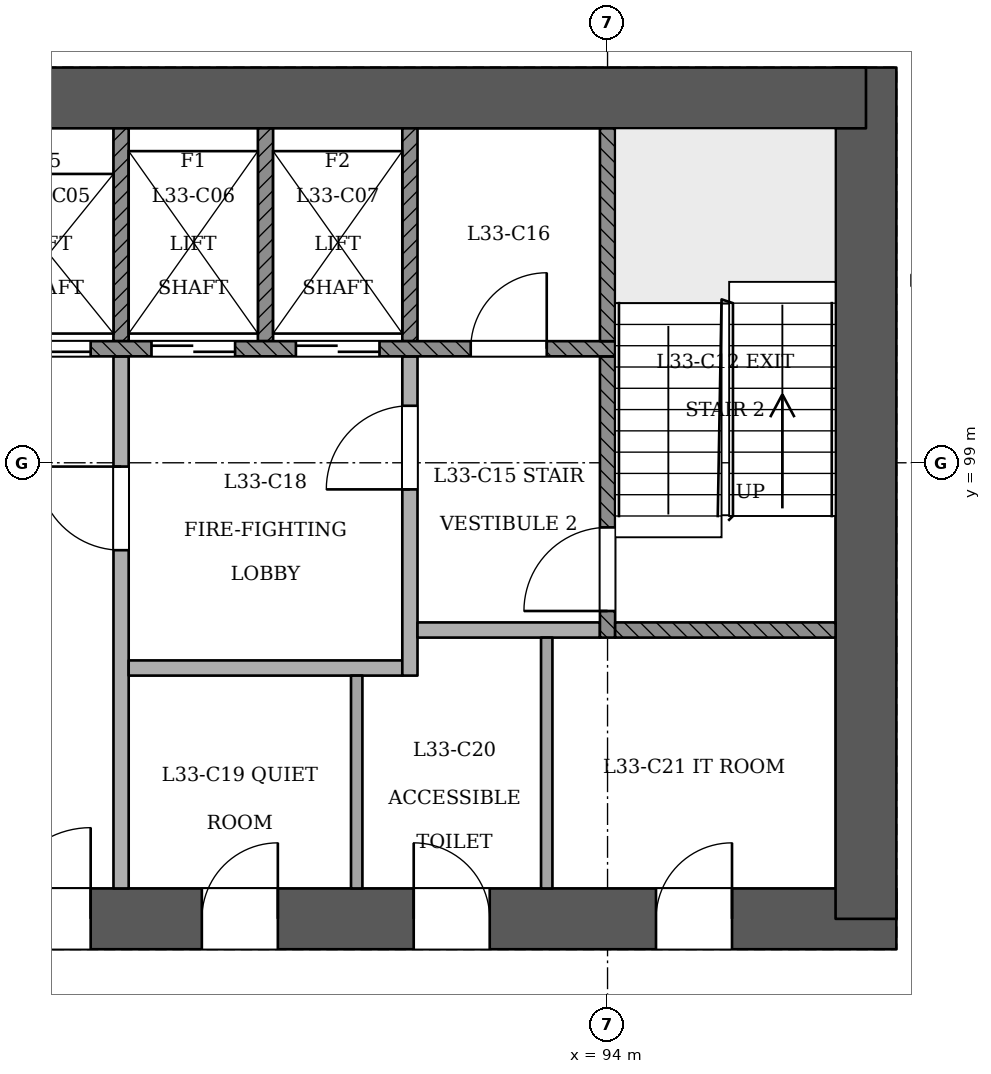
"""IFC4 building model, lengths in metres.
Left out: names, types, materials, properties, quantities, classifications, styles, units other than length and angle.
Written with IfcOpenShell. Run it as: python <this file> out.ifc"""

import sys

from ifc_helpers import new_model, si_unit, direction, frame, frame_2d, origin, place, context, subcontext, project, spatial, rectangle, extrude, element, fill, save


model = new_model("IFC4")
c1 = context("Model", 3, precision=1e-05, world=origin(), true_north=direction((0.0, 1.0)))
c2 = subcontext(c1, "Body", "Model", "MODEL_VIEW")
j1 = project(units=[si_unit("LENGTHUNIT", "METRE"), si_unit("PLANEANGLEUNIT", "RADIAN")], contexts=[c1])
p1 = place(None, origin())
s1 = spatial("IfcSite", under=j1, at=p1, CompositionType="ELEMENT")
p2 = place(p1, origin())
s2 = spatial("IfcBuilding", under=s1, at=p2, CompositionType="ELEMENT")
p3 = place(p2, frame((0.0, 0.0, 131.4)))
s3 = spatial("IfcBuildingStorey", under=s2, at=p3, CompositionType="ELEMENT", Elevation=131.4)
p4 = place(p3, frame((72.6, 93.0, 0.0), z_axis=(0.0, 0.0, 1.0), x_axis=(1.0, 0.0, 0.0)))
e1 = element("IfcWall", 1, at=p4, inside=s3, PredefinedType="SHEAR", context=c2, shape_type="SweptSolid", body=[
    extrude(rectangle(XDim=25.2, YDim=0.8, at=frame_2d((12.6, 0.0))), origin(), (0.0, 0.0, 1.0), 3.6),
])
p5 = place(p4, frame((1.2, 0.0, 0.0)))
e2 = element("IfcOpeningElement", 2, at=p5, cuts=e1, PredefinedType="OPENING", context=c2, shape_type="SweptSolid", body=[
    extrude(rectangle(XDim=1.2, YDim=2.1, at=frame_2d((0.6, 1.05))), frame((0.0, 0.411, 0.0), z_axis=(0.0, -1.0, 0.0), x_axis=(1.0, 0.0, 0.0)), (0.0, 0.0, 1.0), 0.821),
])
p6 = place(p4, frame((3.4, 0.0, 0.0)))
e3 = element("IfcOpeningElement", 3, at=p6, cuts=e1, PredefinedType="OPENING", context=c2, shape_type="SweptSolid", body=[
    extrude(rectangle(XDim=1.2, YDim=2.1, at=frame_2d((0.6, 1.05))), frame((0.0, 0.411, 0.0), z_axis=(0.0, -1.0, 0.0), x_axis=(1.0, 0.0, 0.0)), (0.0, 0.0, 1.0), 0.821),
])
p7 = place(p4, frame((13.4, 0.0, 0.0)))
e4 = element("IfcOpeningElement", 4, at=p7, cuts=e1, PredefinedType="OPENING", context=c2, shape_type="SweptSolid", body=[
    extrude(rectangle(XDim=1.2, YDim=2.1, at=frame_2d((0.6, 1.05))), frame((0.0, 0.411, 0.0), z_axis=(0.0, -1.0, 0.0), x_axis=(1.0, 0.0, 0.0)), (0.0, 0.0, 1.0), 0.821),
])
p8 = place(p4, frame((16.062, 0.0, 0.0)))
e5 = element("IfcOpeningElement", 5, at=p8, cuts=e1, PredefinedType="OPENING", context=c2, shape_type="SweptSolid", body=[
    extrude(rectangle(XDim=1.0, YDim=2.1, at=frame_2d((0.5, 1.05))), frame((0.0, 0.411, 0.0), z_axis=(0.0, -1.0, 0.0), x_axis=(1.0, 0.0, 0.0)), (0.0, 0.0, 1.0), 0.821),
])
p9 = place(p4, frame((18.85, 0.0, 0.0)))
e6 = element("IfcOpeningElement", 6, at=p9, cuts=e1, PredefinedType="OPENING", context=c2, shape_type="SweptSolid", body=[
    extrude(rectangle(XDim=1.0, YDim=2.1, at=frame_2d((0.5, 1.05))), frame((0.0, 0.411, 0.0), z_axis=(0.0, -1.0, 0.0), x_axis=(1.0, 0.0, 0.0)), (0.0, 0.0, 1.0), 0.821),
])
p10 = place(p4, frame((22.038, 0.0, 0.0)))
e7 = element("IfcOpeningElement", 7, at=p10, cuts=e1, PredefinedType="OPENING", context=c2, shape_type="SweptSolid", body=[
    extrude(rectangle(XDim=1.0, YDim=2.1, at=frame_2d((0.5, 1.05))), frame((0.0, 0.411, 0.0), z_axis=(0.0, -1.0, 0.0), x_axis=(1.0, 0.0, 0.0)), (0.0, 0.0, 1.0), 0.821),
])
p11 = place(p3, frame((97.4, 93.0, 0.0), z_axis=(0.0, 0.0, 1.0), x_axis=(0.0, 1.0, 0.0)))
e8 = element("IfcWall", 8, at=p11, inside=s3, PredefinedType="SHEAR", context=c2, shape_type="SweptSolid", body=[
    extrude(rectangle(XDim=11.2, YDim=0.8, at=frame_2d((5.6, 0.0))), origin(), (0.0, 0.0, 1.0), 3.6),
])
p12 = place(p3, frame((97.4, 103.8, 0.0), z_axis=(0.0, 0.0, 1.0), x_axis=(-1.0, 0.0, 0.0)))
e9 = element("IfcWall", 9, at=p12, inside=s3, PredefinedType="SHEAR", context=c2, shape_type="SweptSolid", body=[
    extrude(rectangle(XDim=25.2, YDim=0.8, at=frame_2d((12.6, 0.0))), origin(), (0.0, 0.0, 1.0), 3.6),
])
p13 = place(p3, frame((85.131, 63.263, 0.0), z_axis=(0.0, 0.0, 1.0), x_axis=(0.500002881847, 0.866023739943, 0.0)))
e10 = element("IfcWall", 10, at=p13, inside=s3, PredefinedType="PARTITIONING", context=c2, shape_type="SweptSolid", body=[
    extrude(rectangle(XDim=34.013, YDim=0.15, at=frame_2d((17.006, 0.0))), origin(), (0.0, 0.0, 1.0), 2.75),
])
p14 = place(p13, frame((0.351, 0.0, 0.0)))
e11 = element("IfcOpeningElement", 11, at=p14, cuts=e10, PredefinedType="OPENING", context=c2, shape_type="SweptSolid", body=[
    extrude(rectangle(XDim=1.2, YDim=2.1, at=frame_2d((0.6, 1.05))), frame((0.0, 0.085, 0.0), z_axis=(0.0, -1.0, 0.0), x_axis=(1.0, 0.0, 0.0)), (0.0, 0.0, 1.0), 0.171),
])
p15 = place(p13, frame((3.963, 0.0, 0.0)))
e12 = element("IfcOpeningElement", 12, at=p15, cuts=e10, PredefinedType="OPENING", context=c2, shape_type="SweptSolid", body=[
    extrude(rectangle(XDim=1.0, YDim=2.1, at=frame_2d((0.5, 1.05))), frame((0.0, 0.085, 0.0), z_axis=(0.0, -1.0, 0.0), x_axis=(1.0, 0.0, 0.0)), (0.0, 0.0, 1.0), 0.171),
])
p16 = place(p13, frame((9.493, 0.0, 0.0)))
e13 = element("IfcOpeningElement", 13, at=p16, cuts=e10, PredefinedType="OPENING", context=c2, shape_type="SweptSolid", body=[
    extrude(rectangle(XDim=1.0, YDim=2.1, at=frame_2d((0.5, 1.05))), frame((0.0, 0.085, 0.0), z_axis=(0.0, -1.0, 0.0), x_axis=(1.0, 0.0, 0.0)), (0.0, 0.0, 1.0), 0.171),
])
p17 = place(p13, frame((11.818, 0.0, 0.0)))
e14 = element("IfcOpeningElement", 14, at=p17, cuts=e10, PredefinedType="OPENING", context=c2, shape_type="SweptSolid", body=[
    extrude(rectangle(XDim=1.0, YDim=2.1, at=frame_2d((0.5, 1.05))), frame((0.0, 0.085, 0.0), z_axis=(0.0, -1.0, 0.0), x_axis=(1.0, 0.0, 0.0)), (0.0, 0.0, 1.0), 0.171),
])
p18 = place(p13, frame((18.608, 0.0, 0.0)))
e15 = element("IfcOpeningElement", 15, at=p18, cuts=e10, PredefinedType="OPENING", context=c2, shape_type="SweptSolid", body=[
    extrude(rectangle(XDim=1.0, YDim=2.1, at=frame_2d((0.5, 1.05))), frame((0.0, 0.085, 0.0), z_axis=(0.0, -1.0, 0.0), x_axis=(1.0, 0.0, 0.0)), (0.0, 0.0, 1.0), 0.171),
])
p19 = place(p13, frame((20.933, 0.0, 0.0)))
e16 = element("IfcOpeningElement", 16, at=p19, cuts=e10, PredefinedType="OPENING", context=c2, shape_type="SweptSolid", body=[
    extrude(rectangle(XDim=1.0, YDim=2.1, at=frame_2d((0.5, 1.05))), frame((0.0, 0.085, 0.0), z_axis=(0.0, -1.0, 0.0), x_axis=(1.0, 0.0, 0.0)), (0.0, 0.0, 1.0), 0.171),
])
p20 = place(p13, frame((27.493, 0.0, 0.0)))
e17 = element("IfcOpeningElement", 17, at=p20, cuts=e10, PredefinedType="OPENING", context=c2, shape_type="SweptSolid", body=[
    extrude(rectangle(XDim=1.0, YDim=2.1, at=frame_2d((0.5, 1.05))), frame((0.0, 0.085, 0.0), z_axis=(0.0, -1.0, 0.0), x_axis=(1.0, 0.0, 0.0)), (0.0, 0.0, 1.0), 0.171),
])
p21 = place(p13, frame((29.933, 0.0, 0.0)))
e18 = element("IfcOpeningElement", 18, at=p21, cuts=e10, PredefinedType="OPENING", context=c2, shape_type="SweptSolid", body=[
    extrude(rectangle(XDim=1.0, YDim=2.1, at=frame_2d((0.5, 1.05))), frame((0.0, 0.085, 0.0), z_axis=(0.0, -1.0, 0.0), x_axis=(1.0, 0.0, 0.0)), (0.0, 0.0, 1.0), 0.171),
])
p22 = place(p3, frame((87.6, 93.4, 0.0), z_axis=(0.0, 0.0, 1.0), x_axis=(0.0, 1.0, 0.0)))
e19 = element("IfcWall", 19, at=p22, inside=s3, PredefinedType="PARTITIONING", context=c2, shape_type="SweptSolid", body=[
    extrude(rectangle(XDim=7.0, YDim=0.2, at=frame_2d((3.5, 0.0))), origin(), (0.0, 0.0, 1.0), 3.15),
])
p23 = place(p22, frame((4.45, 0.0, 0.0)))
e20 = element("IfcOpeningElement", 20, at=p23, cuts=e19, PredefinedType="OPENING", context=c2, shape_type="SweptSolid", body=[
    extrude(rectangle(XDim=1.1, YDim=2.1, at=frame_2d((0.55, 1.05))), frame((0.0, 0.11, 0.0), z_axis=(0.0, -1.0, 0.0), x_axis=(1.0, 0.0, 0.0)), (0.0, 0.0, 1.0), 0.221),
])
p24 = place(p3, frame((90.7, 93.4, 0.0), z_axis=(0.0, 0.0, 1.0), x_axis=(0.0, 1.0, 0.0)))
e21 = element("IfcWall", 21, at=p24, inside=s3, PredefinedType="PARTITIONING", context=c2, shape_type="SweptSolid", body=[
    extrude(rectangle(XDim=2.8, YDim=0.15, at=frame_2d((1.4, 0.0))), origin(), (0.0, 0.0, 1.0), 3.15),
])
p25 = place(p3, frame((93.2, 93.4, 0.0), z_axis=(0.0, 0.0, 1.0), x_axis=(0.0, 1.0, 0.0)))
e22 = element("IfcWall", 22, at=p25, inside=s3, PredefinedType="PARTITIONING", context=c2, shape_type="SweptSolid", body=[
    extrude(rectangle(XDim=3.3, YDim=0.15, at=frame_2d((1.65, 0.0))), origin(), (0.0, 0.0, 1.0), 3.15),
])
p26 = place(p3, frame((87.7, 96.3, 0.0), z_axis=(0.0, 0.0, 1.0), x_axis=(1.0, 0.0, 0.0)))
e23 = element("IfcWall", 23, at=p26, inside=s3, PredefinedType="PARTITIONING", context=c2, shape_type="SweptSolid", body=[
    extrude(rectangle(XDim=3.6, YDim=0.2, at=frame_2d((1.8, 0.0))), origin(), (0.0, 0.0, 1.0), 3.15),
])
p27 = place(p3, frame((91.4, 96.2, 0.0), z_axis=(0.0, 0.0, 1.0), x_axis=(0.0, 1.0, 0.0)))
e24 = element("IfcWall", 24, at=p27, inside=s3, PredefinedType="PARTITIONING", context=c2, shape_type="SweptSolid", body=[
    extrude(rectangle(XDim=4.2, YDim=0.2, at=frame_2d((2.1, 0.0))), origin(), (0.0, 0.0, 1.0), 3.15),
])
p28 = place(p27, frame((2.45, 0.0, 0.0)))
e25 = element("IfcOpeningElement", 25, at=p28, cuts=e24, PredefinedType="OPENING", context=c2, shape_type="SweptSolid", body=[
    extrude(rectangle(XDim=1.1, YDim=2.1, at=frame_2d((0.55, 1.05))), frame((0.0, 0.11, 0.0), z_axis=(0.0, -1.0, 0.0), x_axis=(1.0, 0.0, 0.0)), (0.0, 0.0, 1.0), 0.221),
])
p29 = place(p3, frame((91.5, 96.8, 0.0), z_axis=(0.0, 0.0, 1.0), x_axis=(1.0, 0.0, 0.0)))
e26 = element("IfcWall", 26, at=p29, inside=s3, PredefinedType="PARTITIONING", context=c2, shape_type="SweptSolid", body=[
    extrude(rectangle(XDim=2.4, YDim=0.2, at=frame_2d((1.2, 0.0))), origin(), (0.0, 0.0, 1.0), 3.15),
])
p30 = place(p3, frame((94.0, 96.7, 0.0), z_axis=(0.0, 0.0, 1.0), x_axis=(0.0, 1.0, 0.0)))
e27 = element("IfcWall", 27, at=p30, inside=s3, PredefinedType="SOLIDWALL", context=c2, shape_type="SweptSolid", body=[
    extrude(rectangle(XDim=3.7, YDim=0.2, at=frame_2d((1.85, 0.0))), origin(), (0.0, 0.0, 1.0), 3.15),
])
p31 = place(p30, frame((0.35, 0.0, 0.0)))
e28 = element("IfcOpeningElement", 28, at=p31, cuts=e27, PredefinedType="OPENING", context=c2, shape_type="SweptSolid", body=[
    extrude(rectangle(XDim=1.1, YDim=2.1, at=frame_2d((0.55, 1.05))), frame((0.0, 0.11, 0.0), z_axis=(0.0, -1.0, 0.0), x_axis=(1.0, 0.0, 0.0)), (0.0, 0.0, 1.0), 0.221),
])
p32 = place(p3, frame((94.1, 96.8, 0.0), z_axis=(0.0, 0.0, 1.0), x_axis=(1.0, 0.0, 0.0)))
e29 = element("IfcWall", 29, at=p32, inside=s3, PredefinedType="SOLIDWALL", context=c2, shape_type="SweptSolid", body=[
    extrude(rectangle(XDim=2.9, YDim=0.2, at=frame_2d((1.45, 0.0))), origin(), (0.0, 0.0, 1.0), 3.15),
])
p33 = place(p3, frame((75.9, 100.5, 0.0), z_axis=(0.0, 0.0, 1.0), x_axis=(1.0, 0.0, 0.0)))
e30 = element("IfcWall", 30, at=p33, inside=s3, PredefinedType="SOLIDWALL", context=c2, shape_type="SweptSolid", body=[
    extrude(rectangle(XDim=18.2, YDim=0.2, at=frame_2d((9.1, 0.0))), origin(), (0.0, 0.0, 1.0), 3.15),
])
p34 = place(p33, frame((2.6, 0.0, 0.0)))
e31 = element("IfcOpeningElement", 31, at=p34, cuts=e30, PredefinedType="OPENING", context=c2, shape_type="SweptSolid", body=[
    extrude(rectangle(XDim=1.1, YDim=2.1, at=frame_2d((0.55, 1.05))), frame((0.0, 0.11, 0.0), z_axis=(0.0, -1.0, 0.0), x_axis=(1.0, 0.0, 0.0)), (0.0, 0.0, 1.0), 0.221),
])
p35 = place(p33, frame((4.5, 0.0, 0.0)))
e32 = element("IfcOpeningElement", 32, at=p35, cuts=e30, PredefinedType="OPENING", context=c2, shape_type="SweptSolid", body=[
    extrude(rectangle(XDim=1.1, YDim=2.1, at=frame_2d((0.55, 1.05))), frame((0.0, 0.11, 0.0), z_axis=(0.0, -1.0, 0.0), x_axis=(1.0, 0.0, 0.0)), (0.0, 0.0, 1.0), 0.221),
])
p36 = place(p33, frame((6.4, 0.0, 0.0)))
e33 = element("IfcOpeningElement", 33, at=p36, cuts=e30, PredefinedType="OPENING", context=c2, shape_type="SweptSolid", body=[
    extrude(rectangle(XDim=1.1, YDim=2.1, at=frame_2d((0.55, 1.05))), frame((0.0, 0.11, 0.0), z_axis=(0.0, -1.0, 0.0), x_axis=(1.0, 0.0, 0.0)), (0.0, 0.0, 1.0), 0.221),
])
p37 = place(p33, frame((8.3, 0.0, 0.0)))
e34 = element("IfcOpeningElement", 34, at=p37, cuts=e30, PredefinedType="OPENING", context=c2, shape_type="SweptSolid", body=[
    extrude(rectangle(XDim=1.1, YDim=2.1, at=frame_2d((0.55, 1.05))), frame((0.0, 0.11, 0.0), z_axis=(0.0, -1.0, 0.0), x_axis=(1.0, 0.0, 0.0)), (0.0, 0.0, 1.0), 0.221),
])
p38 = place(p33, frame((10.2, 0.0, 0.0)))
e35 = element("IfcOpeningElement", 35, at=p38, cuts=e30, PredefinedType="OPENING", context=c2, shape_type="SweptSolid", body=[
    extrude(rectangle(XDim=1.1, YDim=2.1, at=frame_2d((0.55, 1.05))), frame((0.0, 0.11, 0.0), z_axis=(0.0, -1.0, 0.0), x_axis=(1.0, 0.0, 0.0)), (0.0, 0.0, 1.0), 0.221),
])
p39 = place(p33, frame((12.1, 0.0, 0.0)))
e36 = element("IfcOpeningElement", 36, at=p39, cuts=e30, PredefinedType="OPENING", context=c2, shape_type="SweptSolid", body=[
    extrude(rectangle(XDim=1.1, YDim=2.1, at=frame_2d((0.55, 1.05))), frame((0.0, 0.11, 0.0), z_axis=(0.0, -1.0, 0.0), x_axis=(1.0, 0.0, 0.0)), (0.0, 0.0, 1.0), 0.221),
])
p40 = place(p33, frame((14.0, 0.0, 0.0)))
e37 = element("IfcOpeningElement", 37, at=p40, cuts=e30, PredefinedType="OPENING", context=c2, shape_type="SweptSolid", body=[
    extrude(rectangle(XDim=1.1, YDim=2.1, at=frame_2d((0.55, 1.05))), frame((0.0, 0.11, 0.0), z_axis=(0.0, -1.0, 0.0), x_axis=(1.0, 0.0, 0.0)), (0.0, 0.0, 1.0), 0.221),
])
p41 = place(p33, frame((0.65, 0.0, 0.0)))
e38 = element("IfcOpeningElement", 38, at=p41, cuts=e30, PredefinedType="OPENING", context=c2, shape_type="SweptSolid", body=[
    extrude(rectangle(XDim=1.0, YDim=2.1, at=frame_2d((0.5, 1.05))), frame((0.0, 0.11, 0.0), z_axis=(0.0, -1.0, 0.0), x_axis=(1.0, 0.0, 0.0)), (0.0, 0.0, 1.0), 0.221),
])
p42 = place(p33, frame((16.3, 0.0, 0.0)))
e39 = element("IfcOpeningElement", 39, at=p42, cuts=e30, PredefinedType="OPENING", context=c2, shape_type="SweptSolid", body=[
    extrude(rectangle(XDim=1.0, YDim=2.1, at=frame_2d((0.5, 1.05))), frame((0.0, 0.11, 0.0), z_axis=(0.0, -1.0, 0.0), x_axis=(1.0, 0.0, 0.0)), (0.0, 0.0, 1.0), 0.221),
])
for number, where, z_axis, x_axis in (
    (40, (87.6, 100.6, 0.0), (0.0, 0.0, 1.0), (0.0, 1.0, 0.0)),
    (41, (89.5, 100.6, 0.0), (0.0, 0.0, 1.0), (0.0, 1.0, 0.0)),
    (42, (91.4, 100.6, 0.0), (0.0, 0.0, 1.0), (0.0, 1.0, 0.0)),
    (43, (94.0, 100.6, 0.0), (0.0, 0.0, 1.0), (0.0, 1.0, 0.0)),
):
    element("IfcWall", number, at=place(p3, frame(where, z_axis=z_axis, x_axis=x_axis)), inside=s3, PredefinedType="SOLIDWALL", context=c2, shape_type="SweptSolid", body=[
        extrude(rectangle(XDim=2.8, YDim=0.2, at=frame_2d((1.4, 0.0))), origin(), (0.0, 0.0, 1.0), 3.15),
    ])
p43 = place(p38, origin())
e44 = element("IfcDoor", 44, at=p43, inside=s3, OperationType="SLIDING_TO_RIGHT", PredefinedType="NOTDEFINED", context=c2, shape_type="SweptSolid", body=[
    extrude(rectangle(XDim=1.1, YDim=2.1, at=frame_2d((0.55, 1.05))), frame((0.0, 0.025, 0.0), z_axis=(0.0, -1.0, 0.0), x_axis=(1.0, 0.0, 0.0)), (0.0, 0.0, 1.0), 0.05),
])
fill(e35, e44)
p44 = place(p39, origin())
e45 = element("IfcDoor", 45, at=p44, inside=s3, OperationType="SLIDING_TO_RIGHT", PredefinedType="NOTDEFINED", context=c2, shape_type="SweptSolid", body=[
    extrude(rectangle(XDim=1.1, YDim=2.1, at=frame_2d((0.55, 1.05))), frame((0.0, 0.025, 0.0), z_axis=(0.0, -1.0, 0.0), x_axis=(1.0, 0.0, 0.0)), (0.0, 0.0, 1.0), 0.05),
])
fill(e36, e45)
p45 = place(p40, origin())
e46 = element("IfcDoor", 46, at=p45, inside=s3, OperationType="SLIDING_TO_LEFT", PredefinedType="NOTDEFINED", context=c2, shape_type="SweptSolid", body=[
    extrude(rectangle(XDim=1.1, YDim=2.1, at=frame_2d((0.55, 1.05))), frame((0.0, 0.025, 0.0), z_axis=(0.0, -1.0, 0.0), x_axis=(1.0, 0.0, 0.0)), (0.0, 0.0, 1.0), 0.05),
])
fill(e37, e46)
p46 = place(p31, origin())
e47 = element("IfcDoor", 47, at=p46, inside=s3, OperationType="SINGLE_SWING_LEFT", PredefinedType="NOTDEFINED", context=c2, shape_type="SweptSolid", body=[
    extrude(rectangle(XDim=1.1, YDim=2.1, at=frame_2d((0.55, 1.05))), frame((0.0, 0.025, 0.0), z_axis=(0.0, -1.0, 0.0), x_axis=(1.0, 0.0, 0.0)), (0.0, 0.0, 1.0), 0.05),
])
fill(e28, e47)
p47 = place(p23, origin())
e48 = element("IfcDoor", 48, at=p47, inside=s3, OperationType="SINGLE_SWING_RIGHT", PredefinedType="NOTDEFINED", context=c2, shape_type="SweptSolid", body=[
    extrude(rectangle(XDim=1.1, YDim=2.1, at=frame_2d((0.55, 1.05))), frame((0.0, 0.025, 0.0), z_axis=(0.0, -1.0, 0.0), x_axis=(1.0, 0.0, 0.0)), (0.0, 0.0, 1.0), 0.05),
])
fill(e20, e48)
p48 = place(p28, origin())
e49 = element("IfcDoor", 49, at=p48, inside=s3, OperationType="SINGLE_SWING_LEFT", PredefinedType="NOTDEFINED", context=c2, shape_type="SweptSolid", body=[
    extrude(rectangle(XDim=1.1, YDim=2.1, at=frame_2d((0.55, 1.05))), frame((0.0, 0.025, 0.0), z_axis=(0.0, -1.0, 0.0), x_axis=(1.0, 0.0, 0.0)), (0.0, 0.0, 1.0), 0.05),
])
fill(e25, e49)
p49 = place(p7, origin())
e50 = element("IfcDoor", 50, at=p49, inside=s3, OperationType="SINGLE_SWING_RIGHT", PredefinedType="NOTDEFINED", context=c2, shape_type="SweptSolid", body=[
    extrude(rectangle(XDim=1.2, YDim=2.1, at=frame_2d((0.6, 1.05))), frame((0.0, 0.025, 0.0), z_axis=(0.0, -1.0, 0.0), x_axis=(1.0, 0.0, 0.0)), (0.0, 0.0, 1.0), 0.05),
])
fill(e4, e50)
p50 = place(p42, origin())
e51 = element("IfcDoor", 51, at=p50, inside=s3, OperationType="SINGLE_SWING_RIGHT", PredefinedType="NOTDEFINED", context=c2, shape_type="SweptSolid", body=[
    extrude(rectangle(XDim=1.0, YDim=2.1, at=frame_2d((0.5, 1.05))), frame((0.0, 0.025, 0.0), z_axis=(0.0, -1.0, 0.0), x_axis=(1.0, 0.0, 0.0)), (0.0, 0.0, 1.0), 0.05),
])
fill(e39, e51)
p51 = place(p8, origin())
e52 = element("IfcDoor", 52, at=p51, inside=s3, OperationType="SINGLE_SWING_RIGHT", PredefinedType="NOTDEFINED", context=c2, shape_type="SweptSolid", body=[
    extrude(rectangle(XDim=1.0, YDim=2.1, at=frame_2d((0.5, 1.05))), frame((0.0, 0.025, 0.0), z_axis=(0.0, -1.0, 0.0), x_axis=(1.0, 0.0, 0.0)), (0.0, 0.0, 1.0), 0.05),
])
fill(e5, e52)
p52 = place(p9, origin())
e53 = element("IfcDoor", 53, at=p52, inside=s3, OperationType="SINGLE_SWING_LEFT", PredefinedType="NOTDEFINED", context=c2, shape_type="SweptSolid", body=[
    extrude(rectangle(XDim=1.0, YDim=2.1, at=frame_2d((0.5, 1.05))), frame((0.0, 0.025, 0.0), z_axis=(0.0, -1.0, 0.0), x_axis=(1.0, 0.0, 0.0)), (0.0, 0.0, 1.0), 0.05),
])
fill(e6, e53)
p53 = place(p10, origin())
e54 = element("IfcDoor", 54, at=p53, inside=s3, OperationType="SINGLE_SWING_RIGHT", PredefinedType="NOTDEFINED", context=c2, shape_type="SweptSolid", body=[
    extrude(rectangle(XDim=1.0, YDim=2.1, at=frame_2d((0.5, 1.05))), frame((0.0, 0.025, 0.0), z_axis=(0.0, -1.0, 0.0), x_axis=(1.0, 0.0, 0.0)), (0.0, 0.0, 1.0), 0.05),
])
fill(e7, e54)
save(model, sys.argv[1])
